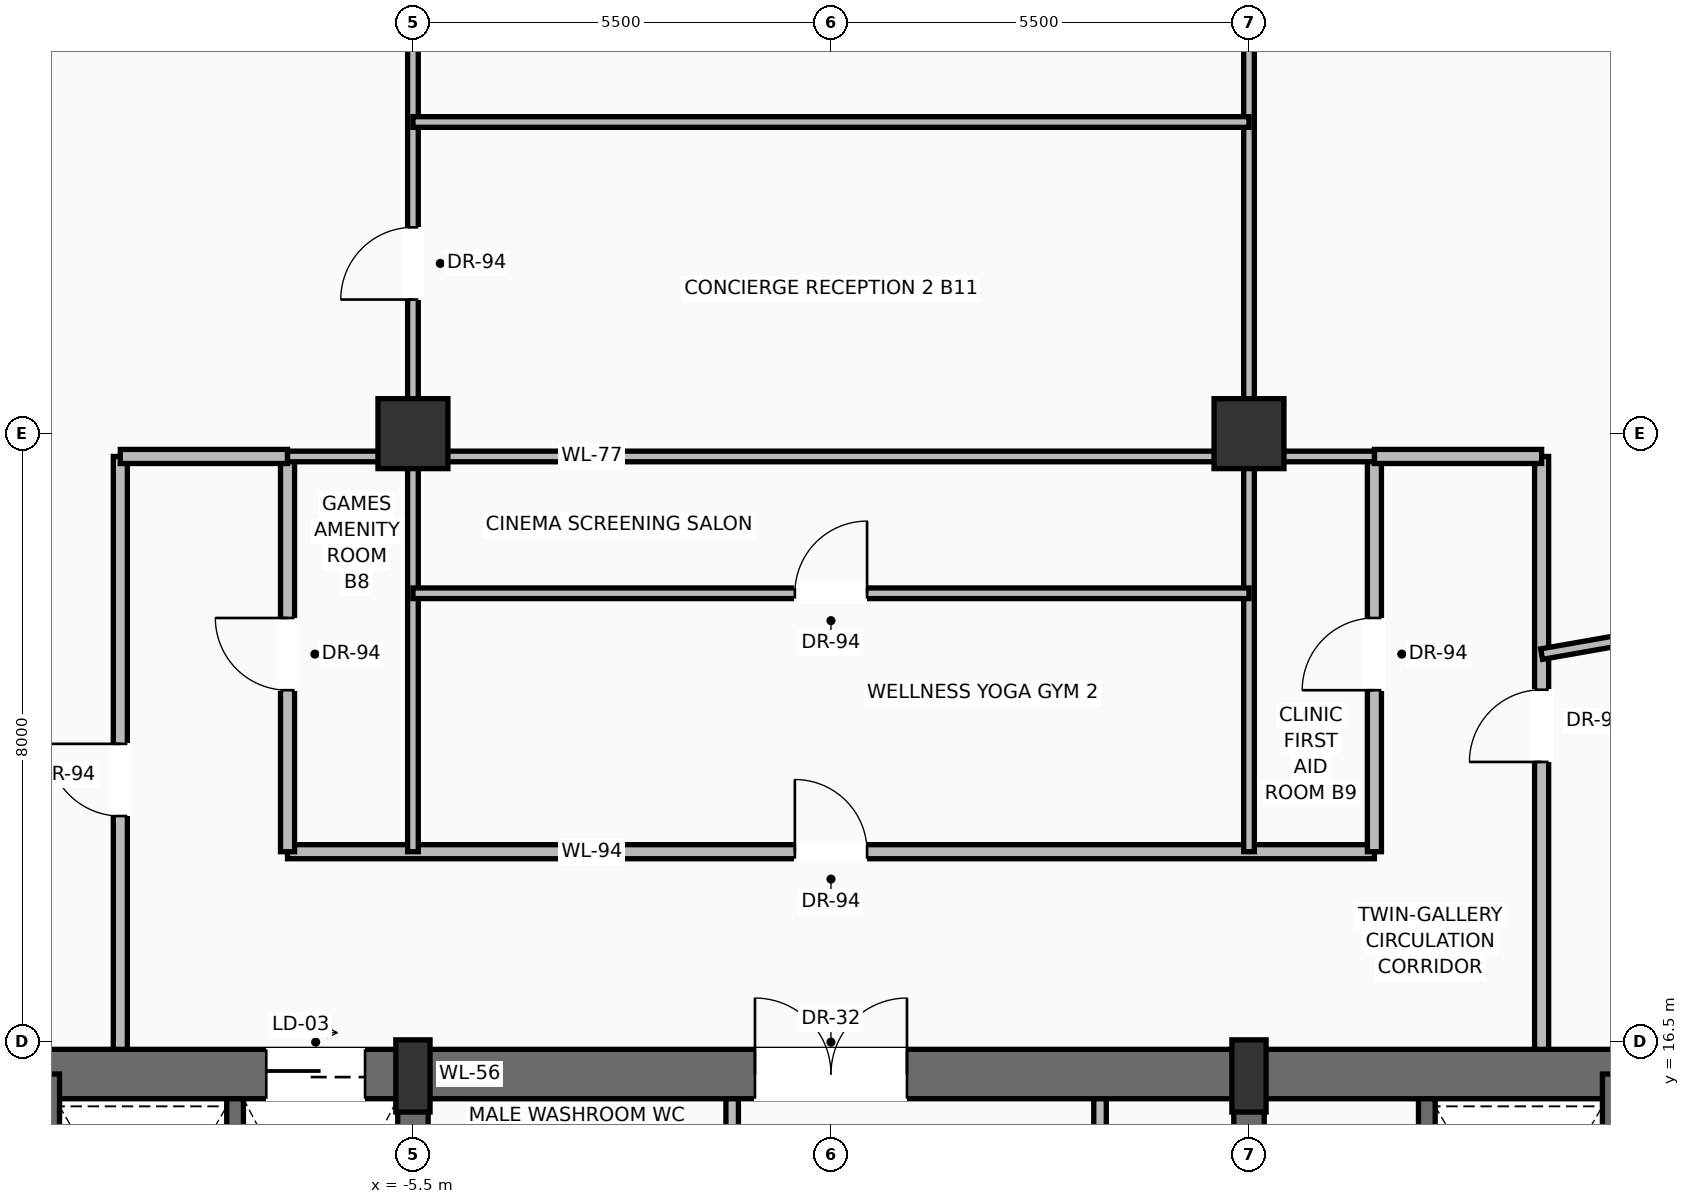
"""IFC4 building model, lengths in metres.
Left out: names, types, materials, properties, quantities, classifications, styles, units other than length and angle.
Written with IfcOpenShell. Run it as: python <this file> out.ifc"""

import sys

from ifc_helpers import new_model, si_unit, direction, frame, frame_2d, origin, origin_2d, place, context, subcontext, project, spatial, rectangle, extrude, source, transform, mapped, element, fill, save


model = new_model("IFC4")
c1 = context("Model", 3, precision=1e-05, world=origin(), true_north=direction((0.0, 1.0)))
c2 = subcontext(c1, "Body", "Model", "MODEL_VIEW")
j1 = project(units=[si_unit("LENGTHUNIT", "METRE"), si_unit("PLANEANGLEUNIT", "RADIAN")], contexts=[c1])
p1 = place(None, origin())
s1 = spatial("IfcSite", under=j1, at=p1, CompositionType="ELEMENT")
p2 = place(p1, origin())
s2 = spatial("IfcBuilding", under=s1, at=p2, CompositionType="ELEMENT")
p3 = place(p2, frame((0.0, 0.0, 162.6)))
s3 = spatial("IfcBuildingStorey", under=s2, at=p3, CompositionType="ELEMENT", Elevation=162.6)
p4 = place(p3, frame((-10.8, 16.075, 0.0), z_axis=(0.0, 0.0, 1.0), x_axis=(1.0, 0.0, 0.0)))
e1 = element("IfcWall", 1, at=p4, inside=s3, PredefinedType="SHEAR", context=c2, shape_type="SweptSolid", body=[
    extrude(rectangle(XDim=21.6, YDim=0.65, at=frame_2d((10.8, 0.0))), origin(), (0.0, 0.0, 1.0), 3.4),
])
p5 = place(p4, frame((3.37, 0.0, 0.0)))
e2 = element("IfcOpeningElement", 2, at=p5, cuts=e1, PredefinedType="OPENING", context=c2, shape_type="SweptSolid", body=[
    extrude(rectangle(XDim=1.3, YDim=2.3, at=frame_2d((0.65, 1.15))), frame((0.0, 0.335, 0.0), z_axis=(0.0, -1.0, 0.0), x_axis=(1.0, 0.0, 0.0)), (0.0, 0.0, 1.0), 0.67),
])
p6 = place(p4, frame((9.8, 0.0, 0.0)))
e3 = element("IfcOpeningElement", 3, at=p6, cuts=e1, PredefinedType="OPENING", context=c2, shape_type="SweptSolid", body=[
    extrude(rectangle(XDim=2.0, YDim=2.4, at=frame_2d((1.0, 1.2))), frame((0.0, 0.335, 0.0), z_axis=(0.0, -1.0, 0.0), x_axis=(1.0, 0.0, 0.0)), (0.0, 0.0, 1.0), 0.67),
])
for number, where, z_axis, x_axis in (
    (4, (-10.475, 0.525, 0.0), (0.0, 0.0, 1.0), (0.0, 1.0, 0.0)),
    (5, (10.475, 0.525, 0.0), (0.0, 0.0, 1.0), (0.0, 1.0, 0.0)),
):
    element("IfcWall", number, at=place(p3, frame(where, z_axis=z_axis, x_axis=x_axis)), inside=s3, PredefinedType="SHEAR", context=c2, shape_type="SweptSolid", body=[
        extrude(rectangle(XDim=15.55, YDim=0.65, at=frame_2d((7.775, 0.0))), origin(), (0.0, 0.0, 1.0), 3.4),
    ])
p7 = place(p3, frame((-5.5, 0.525, 0.0), z_axis=(0.0, 0.0, 1.0), x_axis=(0.0, 1.0, 0.0)))
e6 = element("IfcWall", 6, at=p7, inside=s3, PredefinedType="SHEAR", context=c2, shape_type="SweptSolid", body=[
    extrude(rectangle(XDim=15.55, YDim=0.4, at=frame_2d((7.775, 0.0))), origin(), (0.0, 0.0, 1.0), 3.4),
])
p8 = place(p7, frame((8.975, 0.0, 0.0)))
e7 = element("IfcOpeningElement", 7, at=p8, cuts=e6, PredefinedType="OPENING", context=c2, shape_type="SweptSolid", body=[
    extrude(rectangle(XDim=1.1, YDim=2.2, at=frame_2d((0.55, 1.1))), frame((0.0, 0.21, 0.0), z_axis=(0.0, -1.0, 0.0), x_axis=(1.0, 0.0, 0.0)), (0.0, 0.0, 1.0), 0.42),
])
p9 = place(p3, frame((5.5, 0.525, 0.0), z_axis=(0.0, 0.0, 1.0), x_axis=(0.0, 1.0, 0.0)))
e8 = element("IfcWall", 8, at=p9, inside=s3, PredefinedType="SHEAR", context=c2, shape_type="SweptSolid", body=[
    extrude(rectangle(XDim=15.55, YDim=0.4, at=frame_2d((7.775, 0.0))), origin(), (0.0, 0.0, 1.0), 3.4),
])
p10 = place(p9, frame((8.975, 0.0, 0.0)))
e9 = element("IfcOpeningElement", 9, at=p10, cuts=e8, PredefinedType="OPENING", context=c2, shape_type="SweptSolid", body=[
    extrude(rectangle(XDim=1.1, YDim=2.2, at=frame_2d((0.55, 1.1))), frame((0.0, 0.21, 0.0), z_axis=(0.0, -1.0, 0.0), x_axis=(1.0, 0.0, 0.0)), (0.0, 0.0, 1.0), 0.42),
])
m1 = source(origin(), c2, "Body", "SweptSolid", [
    extrude(rectangle(XDim=0.45, YDim=0.95, at=origin_2d()), origin(), (0.0, 0.0, 1.0), 3.7),
])
for number, where, z_axis, x_axis in (
    (10, (-5.5, 16.05, 0.0), (0.0, 0.0, 1.0), (1.0, 0.0, 0.0)),
    (11, (5.5, 16.05, 0.0), (0.0, 0.0, 1.0), (1.0, 0.0, 0.0)),
):
    element("IfcColumn", number, at=place(p3, frame(where, z_axis=z_axis, x_axis=x_axis)), inside=s3, PredefinedType="PILASTER", context=c2, shape_type="MappedRepresentation", body=[
        mapped(m1, transform((0.0, 0.0, 0.0), scale=1.0)),
    ])
m2 = source(origin(), c2, "Body", "SweptSolid", [
    extrude(rectangle(XDim=0.92, YDim=0.92, at=origin_2d()), origin(), (0.0, 0.0, 1.0), 3.7),
])
for number, where, z_axis, x_axis in (
    (12, (-5.5, 24.5, 0.0), (0.0, 0.0, 1.0), (1.0, 0.0, 0.0)),
    (13, (5.5, 24.5, 0.0), (0.0, 0.0, 1.0), (1.0, 0.0, 0.0)),
):
    element("IfcColumn", number, at=place(p3, frame(where, z_axis=z_axis, x_axis=x_axis)), inside=s3, PredefinedType="COLUMN", context=c2, shape_type="MappedRepresentation", body=[
        mapped(m2, transform((0.0, 0.0, 0.0), scale=1.0)),
    ])
for number, where, z_axis, x_axis in (
    (14, (-7.84, 11.87, 0.0), (0.0, 0.0, 1.0), (0.0, 1.0, 0.0)),
    (15, (7.84, 11.87, 0.0), (0.0, 0.0, 1.0), (0.0, 1.0, 0.0)),
):
    element("IfcWall", number, at=place(p3, frame(where, z_axis=z_axis, x_axis=x_axis)), inside=s3, PredefinedType="SOLIDWALL", context=c2, shape_type="SweptSolid", body=[
        extrude(rectangle(XDim=3.88, YDim=0.22, at=frame_2d((1.94, 0.0))), origin(), (0.0, 0.0, 1.0), 3.4),
    ])
p11 = place(p3, frame((-1.3, 13.6, 0.0), z_axis=(0.0, 0.0, 1.0), x_axis=(0.0, 1.0, 0.0)))
e16 = element("IfcWall", 16, at=p11, inside=s3, PredefinedType="PARTITIONING", context=c2, shape_type="SweptSolid", body=[
    extrude(rectangle(XDim=2.15, YDim=0.165, at=frame_2d((1.075, 0.0))), origin(), (0.0, 0.0, 1.0), 3.392),
])
p12 = place(p11, frame((0.55, 0.0, 0.0)))
e17 = element("IfcOpeningElement", 17, at=p12, cuts=e16, PredefinedType="OPENING", context=c2, shape_type="SweptSolid", body=[
    extrude(rectangle(XDim=0.9, YDim=2.1, at=frame_2d((0.45, 1.05))), frame((0.0, 0.093, 0.0), z_axis=(0.0, -1.0, 0.0), x_axis=(1.0, 0.0, 0.0)), (0.0, 0.0, 1.0), 0.185),
])
p13 = place(p3, frame((3.54, 11.22, 0.0), z_axis=(0.0, 0.0, 1.0), x_axis=(0.0, 1.0, 0.0)))
e18 = element("IfcWall", 18, at=p13, inside=s3, PredefinedType="PARTITIONING", context=c2, shape_type="SweptSolid", body=[
    extrude(rectangle(XDim=4.53, YDim=0.165, at=frame_2d((2.265, 0.0))), origin(), (0.0, 0.0, 1.0), 3.392),
])
p14 = place(p13, frame((1.25, 0.0, 0.0)))
e19 = element("IfcOpeningElement", 19, at=p14, cuts=e18, PredefinedType="OPENING", context=c2, shape_type="SweptSolid", body=[
    extrude(rectangle(XDim=0.9, YDim=2.1, at=frame_2d((0.45, 1.05))), frame((0.0, 0.093, 0.0), z_axis=(0.0, -1.0, 0.0), x_axis=(1.0, 0.0, 0.0)), (0.0, 0.0, 1.0), 0.185),
])
p15 = place(p3, frame((-7.15, 19.0, 0.0), z_axis=(0.0, 0.0, 1.0), x_axis=(1.0, 0.0, 0.0)))
e20 = element("IfcWall", 20, at=p15, inside=s3, PredefinedType="PARTITIONING", context=c2, shape_type="SweptSolid", body=[
    extrude(rectangle(XDim=14.3, YDim=0.185, at=frame_2d((7.15, 0.0))), origin(), (0.0, 0.0, 1.0), 2.776),
])
p16 = place(p15, frame((6.675, 0.0, 0.0)))
e21 = element("IfcOpeningElement", 21, at=p16, cuts=e20, PredefinedType="OPENING", context=c2, shape_type="SweptSolid", body=[
    extrude(rectangle(XDim=0.95, YDim=2.2, at=frame_2d((0.475, 1.1))), frame((0.0, 0.103, 0.0), z_axis=(0.0, -1.0, 0.0), x_axis=(1.0, 0.0, 0.0)), (0.0, 0.0, 1.0), 0.205),
])
p17 = place(p3, frame((-7.15, 19.0, 0.0), z_axis=(0.0, 0.0, 1.0), x_axis=(0.0, 1.0, 0.0)))
e22 = element("IfcWall", 22, at=p17, inside=s3, PredefinedType="PARTITIONING", context=c2, shape_type="SweptSolid", body=[
    extrude(rectangle(XDim=5.2, YDim=0.185, at=frame_2d((2.6, 0.0))), origin(), (0.0, 0.0, 1.0), 3.392),
])
p18 = place(p17, frame((2.125, 0.0, 0.0)))
e23 = element("IfcOpeningElement", 23, at=p18, cuts=e22, PredefinedType="OPENING", context=c2, shape_type="SweptSolid", body=[
    extrude(rectangle(XDim=0.95, YDim=2.2, at=frame_2d((0.475, 1.1))), frame((0.0, 0.103, 0.0), z_axis=(0.0, -1.0, 0.0), x_axis=(1.0, 0.0, 0.0)), (0.0, 0.0, 1.0), 0.205),
])
p19 = place(p3, frame((7.15, 19.0, 0.0), z_axis=(0.0, 0.0, 1.0), x_axis=(0.0, 1.0, 0.0)))
e24 = element("IfcWall", 24, at=p19, inside=s3, PredefinedType="PARTITIONING", context=c2, shape_type="SweptSolid", body=[
    extrude(rectangle(XDim=5.2, YDim=0.185, at=frame_2d((2.6, 0.0))), origin(), (0.0, 0.0, 1.0), 3.392),
])
p20 = place(p19, frame((2.125, 0.0, 0.0)))
e25 = element("IfcOpeningElement", 25, at=p20, cuts=e24, PredefinedType="OPENING", context=c2, shape_type="SweptSolid", body=[
    extrude(rectangle(XDim=0.95, YDim=2.2, at=frame_2d((0.475, 1.1))), frame((0.0, 0.103, 0.0), z_axis=(0.0, -1.0, 0.0), x_axis=(1.0, 0.0, 0.0)), (0.0, 0.0, 1.0), 0.205),
])
p21 = place(p3, frame((-9.35, 16.4, 0.0), z_axis=(0.0, 0.0, 1.0), x_axis=(0.0, 1.0, 0.0)))
e26 = element("IfcWall", 26, at=p21, inside=s3, PredefinedType="PARTITIONING", context=c2, shape_type="SweptSolid", body=[
    extrude(rectangle(XDim=7.8, YDim=0.185, at=frame_2d((3.9, 0.0))), origin(), (0.0, 0.0, 1.0), 3.392),
])
p22 = place(p21, frame((3.069, 0.0, 0.0)))
e27 = element("IfcOpeningElement", 27, at=p22, cuts=e26, PredefinedType="OPENING", context=c2, shape_type="SweptSolid", body=[
    extrude(rectangle(XDim=0.95, YDim=2.2, at=frame_2d((0.475, 1.1))), frame((0.0, 0.103, 0.0), z_axis=(0.0, -1.0, 0.0), x_axis=(1.0, 0.0, 0.0)), (0.0, 0.0, 1.0), 0.205),
])
p23 = place(p3, frame((9.35, 16.4, 0.0), z_axis=(0.0, 0.0, 1.0), x_axis=(0.0, 1.0, 0.0)))
e28 = element("IfcWall", 28, at=p23, inside=s3, PredefinedType="PARTITIONING", context=c2, shape_type="SweptSolid", body=[
    extrude(rectangle(XDim=7.8, YDim=0.185, at=frame_2d((3.9, 0.0))), origin(), (0.0, 0.0, 1.0), 3.392),
])
p24 = place(p23, frame((3.781, 0.0, 0.0)))
e29 = element("IfcOpeningElement", 29, at=p24, cuts=e28, PredefinedType="OPENING", context=c2, shape_type="SweptSolid", body=[
    extrude(rectangle(XDim=0.95, YDim=2.2, at=frame_2d((0.475, 1.1))), frame((0.0, 0.103, 0.0), z_axis=(0.0, -1.0, 0.0), x_axis=(1.0, 0.0, 0.0)), (0.0, 0.0, 1.0), 0.205),
])
for number, where, z_axis, x_axis in (
    (30, (-9.35, 24.2, 0.0), (0.0, 0.0, 1.0), (1.0, 0.0, 0.0)),
    (31, (7.15, 24.2, 0.0), (0.0, 0.0, 1.0), (1.0, 0.0, 0.0)),
):
    element("IfcWall", number, at=place(p3, frame(where, z_axis=z_axis, x_axis=x_axis)), inside=s3, PredefinedType="PARTITIONING", context=c2, shape_type="SweptSolid", body=[
        extrude(rectangle(XDim=2.2, YDim=0.185, at=frame_2d((1.1, 0.0))), origin(), (0.0, 0.0, 1.0), 3.392),
    ])
p25 = place(p3, frame((-7.15, 24.2, 0.0), z_axis=(0.0, 0.0, 1.0), x_axis=(1.0, 0.0, 0.0)))
e32 = element("IfcWall", 32, at=p25, inside=s3, PredefinedType="PARTITIONING", context=c2, shape_type="SweptSolid", body=[
    extrude(rectangle(XDim=14.3, YDim=0.14, at=frame_2d((7.15, 0.0))), origin(), (0.0, 0.0, 1.0), 3.392),
])
p26 = place(p3, frame((-5.5, 19.0, 0.0), z_axis=(0.0, 0.0, 1.0), x_axis=(0.0, 1.0, 0.0)))
e33 = element("IfcWall", 33, at=p26, inside=s3, PredefinedType="PARTITIONING", context=c2, shape_type="SweptSolid", body=[
    extrude(rectangle(XDim=13.5, YDim=0.14, at=frame_2d((6.75, 0.0))), origin(), (0.0, 0.0, 1.0), 2.776),
])
p27 = place(p26, frame((7.264, 0.0, 0.0)))
e34 = element("IfcOpeningElement", 34, at=p27, cuts=e33, PredefinedType="OPENING", context=c2, shape_type="SweptSolid", body=[
    extrude(rectangle(XDim=0.95, YDim=2.2, at=frame_2d((0.475, 1.1))), frame((0.0, 0.08, 0.0), z_axis=(0.0, -1.0, 0.0), x_axis=(1.0, 0.0, 0.0)), (0.0, 0.0, 1.0), 0.16),
])
p28 = place(p3, frame((5.5, 19.0, 0.0), z_axis=(0.0, 0.0, 1.0), x_axis=(0.0, 1.0, 0.0)))
e35 = element("IfcWall", 35, at=p28, inside=s3, PredefinedType="PARTITIONING", context=c2, shape_type="SweptSolid", body=[
    extrude(rectangle(XDim=13.5, YDim=0.14, at=frame_2d((6.75, 0.0))), origin(), (0.0, 0.0, 1.0), 2.776),
])
p29 = place(p3, frame((-5.5, 22.4, 0.0), z_axis=(0.0, 0.0, 1.0), x_axis=(1.0, 0.0, 0.0)))
e36 = element("IfcWall", 36, at=p29, inside=s3, PredefinedType="PARTITIONING", context=c2, shape_type="SweptSolid", body=[
    extrude(rectangle(XDim=11.0, YDim=0.14, at=frame_2d((5.5, 0.0))), origin(), (0.0, 0.0, 1.0), 3.392),
])
p30 = place(p29, frame((5.025, 0.0, 0.0)))
e37 = element("IfcOpeningElement", 37, at=p30, cuts=e36, PredefinedType="OPENING", context=c2, shape_type="SweptSolid", body=[
    extrude(rectangle(XDim=0.95, YDim=2.2, at=frame_2d((0.475, 1.1))), frame((0.0, 0.08, 0.0), z_axis=(0.0, -1.0, 0.0), x_axis=(1.0, 0.0, 0.0)), (0.0, 0.0, 1.0), 0.16),
])
p31 = place(p3, frame((-5.5, 28.6, 0.0), z_axis=(0.0, 0.0, 1.0), x_axis=(1.0, 0.0, 0.0)))
e38 = element("IfcWall", 38, at=p31, inside=s3, PredefinedType="PARTITIONING", context=c2, shape_type="SweptSolid", body=[
    extrude(rectangle(XDim=11.0, YDim=0.14, at=frame_2d((5.5, 0.0))), origin(), (0.0, 0.0, 1.0), 3.392),
])
p32 = place(p3, frame((9.35, 21.6, 0.0), z_axis=(0.0, 0.0, 1.0), x_axis=(0.985009302956, 0.172501226345, 0.0)))
e39 = element("IfcWall", 39, at=p32, inside=s3, PredefinedType="PARTITIONING", context=c2, shape_type="SweptSolid", body=[
    extrude(rectangle(XDim=7.691, YDim=0.14, at=frame_2d((3.845, 0.0))), origin(), (0.0, 0.0, 1.0), 2.979),
])
m3 = source(origin(), c2, "Body", "SweptSolid", [
    extrude(rectangle(XDim=1.3, YDim=2.3, at=frame_2d((0.65, 1.15))), frame((0.0, 0.025, 0.0), z_axis=(0.0, -1.0, 0.0), x_axis=(1.0, 0.0, 0.0)), (0.0, 0.0, 1.0), 0.05),
])
p33 = place(p5, origin())
e40 = element("IfcDoor", 40, at=p33, inside=s3, OperationType="SLIDING_TO_RIGHT", PredefinedType="DOOR", context=c2, shape_type="MappedRepresentation", body=[
    mapped(m3, transform((0.0, 0.0, 0.0), scale=1.0)),
])
fill(e2, e40)
m4 = source(origin(), c2, "Body", "SweptSolid", [
    extrude(rectangle(XDim=2.0, YDim=2.4, at=frame_2d((1.0, 1.2))), frame((0.0, 0.025, 0.0), z_axis=(0.0, -1.0, 0.0), x_axis=(1.0, 0.0, 0.0)), (0.0, 0.0, 1.0), 0.05),
])
p34 = place(p6, origin())
e41 = element("IfcDoor", 41, at=p34, inside=s3, OperationType="DOUBLE_DOOR_SINGLE_SWING", PredefinedType="DOOR", context=c2, shape_type="MappedRepresentation", body=[
    mapped(m4, transform((0.0, 0.0, 0.0), scale=1.0)),
])
fill(e3, e41)
m5 = source(origin(), c2, "Body", "SweptSolid", [
    extrude(rectangle(XDim=0.95, YDim=2.2, at=frame_2d((0.475, 1.1))), frame((0.0, 0.025, 0.0), z_axis=(0.0, -1.0, 0.0), x_axis=(1.0, 0.0, 0.0)), (0.0, 0.0, 1.0), 0.05),
])
p35 = place(p16, origin())
e42 = element("IfcDoor", 42, at=p35, inside=s3, OperationType="SINGLE_SWING_LEFT", PredefinedType="DOOR", context=c2, shape_type="MappedRepresentation", body=[
    mapped(m5, transform((0.0, 0.0, 0.0), scale=1.0)),
])
fill(e21, e42)
p36 = place(p22, origin())
e43 = element("IfcDoor", 43, at=p36, inside=s3, OperationType="SINGLE_SWING_RIGHT", PredefinedType="DOOR", context=c2, shape_type="MappedRepresentation", body=[
    mapped(m5, transform((0.0, 0.0, 0.0), scale=1.0)),
])
fill(e27, e43)
p37 = place(p24, origin())
e44 = element("IfcDoor", 44, at=p37, inside=s3, OperationType="SINGLE_SWING_LEFT", PredefinedType="DOOR", context=c2, shape_type="MappedRepresentation", body=[
    mapped(m5, transform((0.0, 0.0, 0.0), scale=1.0)),
])
fill(e29, e44)
p38 = place(p18, origin())
e45 = element("IfcDoor", 45, at=p38, inside=s3, OperationType="SINGLE_SWING_RIGHT", PredefinedType="DOOR", context=c2, shape_type="MappedRepresentation", body=[
    mapped(m5, transform((0.0, 0.0, 0.0), scale=1.0)),
])
fill(e23, e45)
p39 = place(p20, origin())
e46 = element("IfcDoor", 46, at=p39, inside=s3, OperationType="SINGLE_SWING_LEFT", PredefinedType="DOOR", context=c2, shape_type="MappedRepresentation", body=[
    mapped(m5, transform((0.0, 0.0, 0.0), scale=1.0)),
])
fill(e25, e46)
p40 = place(p30, origin())
e47 = element("IfcDoor", 47, at=p40, inside=s3, OperationType="SINGLE_SWING_RIGHT", PredefinedType="DOOR", context=c2, shape_type="MappedRepresentation", body=[
    mapped(m5, transform((0.0, 0.0, 0.0), scale=1.0)),
])
fill(e37, e47)
p41 = place(p27, origin())
e48 = element("IfcDoor", 48, at=p41, inside=s3, OperationType="SINGLE_SWING_LEFT", PredefinedType="DOOR", context=c2, shape_type="MappedRepresentation", body=[
    mapped(m5, transform((0.0, 0.0, 0.0), scale=1.0)),
])
fill(e34, e48)
save(model, sys.argv[1])
